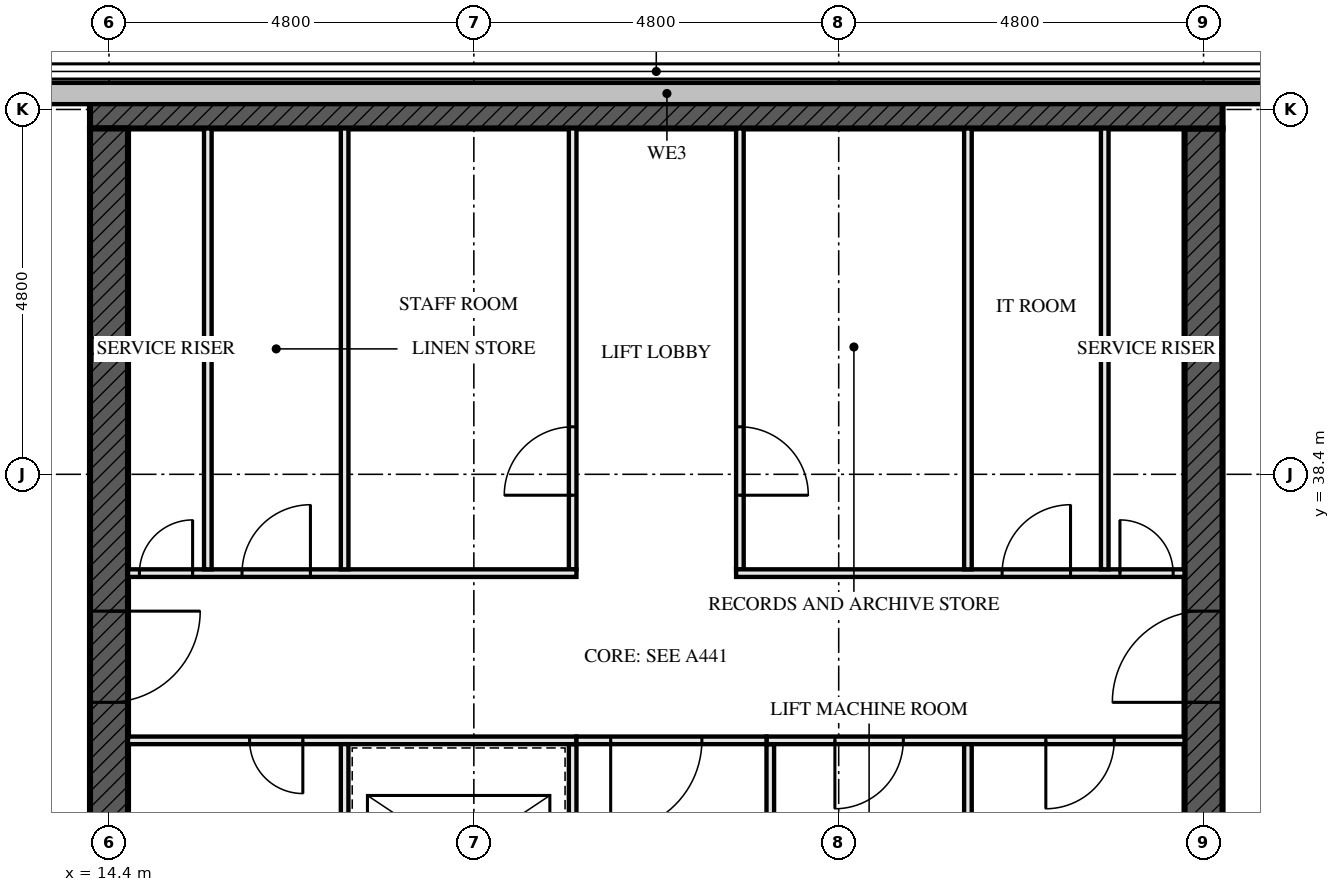
"""IFC4 building model, lengths in metres.
Left out: names, types, materials, properties, quantities, classifications, styles, units other than length and angle.
Written with IfcOpenShell. Run it as: python <this file> out.ifc"""

import sys

from ifc_helpers import new_model, si_unit, direction, frame, frame_2d, origin, place, context, subcontext, project, spatial, rectangle, extrude, element, fill, save


model = new_model("IFC4")
c1 = context("Model", 3, precision=1e-05, world=origin(), true_north=direction((0.0, 1.0)))
c2 = subcontext(c1, "Body", "Model", "MODEL_VIEW")
j1 = project(units=[si_unit("LENGTHUNIT", "METRE"), si_unit("PLANEANGLEUNIT", "RADIAN")], contexts=[c1])
p1 = place(None, origin())
s1 = spatial("IfcSite", under=j1, at=p1, CompositionType="ELEMENT")
p2 = place(p1, origin())
s2 = spatial("IfcBuilding", under=s1, at=p2, CompositionType="ELEMENT")
p3 = place(p2, frame((0.0, 0.0, 248.0)))
s3 = spatial("IfcBuildingStorey", under=s2, at=p3, CompositionType="ELEMENT", Elevation=248.0)
p4 = place(p3, frame((29.05, 43.2, -0.25), z_axis=(0.0, 0.0, 1.0), x_axis=(-1.0, 0.0, 0.0)))
e1 = element("IfcWall", 1, at=p4, inside=s3, PredefinedType="SHEAR", context=c2, shape_type="SweptSolid", body=[
    extrude(rectangle(XDim=14.9, YDim=0.5, at=frame_2d((7.45, 0.0))), origin(), (0.0, 0.0, 1.0), 4.5),
])
p5 = place(p3, frame((14.4, 42.95, -0.25), z_axis=(0.0, 0.0, 1.0), x_axis=(0.0, -1.0, 0.0)))
e2 = element("IfcWall", 2, at=p5, inside=s3, PredefinedType="SHEAR", context=c2, shape_type="SweptSolid", body=[
    extrude(rectangle(XDim=13.9, YDim=0.5, at=frame_2d((6.95, 0.0))), origin(), (0.0, 0.0, 1.0), 4.5),
])
p6 = place(p5, frame((6.35, 0.0, 0.25)))
e3 = element("IfcOpeningElement", 3, at=p6, cuts=e2, PredefinedType="OPENING", context=c2, shape_type="SweptSolid", body=[
    extrude(rectangle(XDim=1.2, YDim=2.1, at=frame_2d((0.6, 1.05))), frame((0.0, 0.26, 0.0), z_axis=(0.0, -1.0, 0.0), x_axis=(1.0, 0.0, 0.0)), (0.0, 0.0, 1.0), 0.521),
])
p7 = place(p3, frame((28.8, 29.05, -0.25), z_axis=(0.0, 0.0, 1.0), x_axis=(0.0, 1.0, 0.0)))
e4 = element("IfcWall", 4, at=p7, inside=s3, PredefinedType="SHEAR", context=c2, shape_type="SweptSolid", body=[
    extrude(rectangle(XDim=13.9, YDim=0.5, at=frame_2d((6.95, 0.0))), origin(), (0.0, 0.0, 1.0), 4.5),
])
p8 = place(p7, frame((6.35, 0.0, 0.25)))
e5 = element("IfcOpeningElement", 5, at=p8, cuts=e4, PredefinedType="OPENING", context=c2, shape_type="SweptSolid", body=[
    extrude(rectangle(XDim=1.2, YDim=2.1, at=frame_2d((0.6, 1.05))), frame((0.0, 0.26, 0.0), z_axis=(0.0, -1.0, 0.0), x_axis=(1.0, 0.0, 0.0)), (0.0, 0.0, 1.0), 0.521),
])
p9 = place(p3, frame((38.75, 43.41, 4.5), z_axis=(0.0, 0.0, 1.0), x_axis=(-1.0, 0.0, 0.0)))
e6 = element("IfcWall", 6, at=p9, inside=s3, PredefinedType="PARAPET", context=c2, shape_type="SweptSolid", body=[
    extrude(rectangle(XDim=34.02, YDim=0.28, at=frame_2d((17.01, 0.0))), origin(), (0.0, 0.0, 1.0), 1.1),
])
for number, where, z_axis, x_axis in (
    (7, (15.7, 37.15, 0.0), (0.0, 0.0, 1.0), (0.0, 1.0, 0.0)),
    (8, (27.5, 37.15, 0.0), (0.0, 0.0, 1.0), (0.0, 1.0, 0.0)),
):
    element("IfcWall", number, at=place(p3, frame(where, z_axis=z_axis, x_axis=x_axis)), inside=s3, PredefinedType="SOLIDWALL", context=c2, shape_type="SweptSolid", body=[
        extrude(rectangle(XDim=5.8, YDim=0.1, at=frame_2d((2.9, 0.0))), origin(), (0.0, 0.0, 1.0), 4.25),
    ])
p10 = place(p3, frame((20.5, 29.05, 0.0), z_axis=(0.0, 0.0, 1.0), x_axis=(0.0, 1.0, 0.0)))
e9 = element("IfcWall", 9, at=p10, inside=s3, PredefinedType="SOLIDWALL", context=c2, shape_type="SweptSolid", body=[
    extrude(rectangle(XDim=5.8, YDim=0.1, at=frame_2d((2.9, 0.0))), origin(), (0.0, 0.0, 1.0), 4.25),
])
p11 = place(p10, frame((0.8, 0.0, 0.0)))
e10 = element("IfcOpeningElement", 10, at=p11, cuts=e9, PredefinedType="OPENING", context=c2, shape_type="SweptSolid", body=[
    extrude(rectangle(XDim=1.1, YDim=2.3, at=frame_2d((0.55, 1.15))), frame((0.0, 0.061, 0.0), z_axis=(0.0, -1.0, 0.0), x_axis=(1.0, 0.0, 0.0)), (0.0, 0.0, 1.0), 0.121),
])
p12 = place(p10, frame((3.775, 0.0, 0.0)))
e11 = element("IfcOpeningElement", 11, at=p12, cuts=e9, PredefinedType="OPENING", context=c2, shape_type="SweptSolid", body=[
    extrude(rectangle(XDim=1.1, YDim=2.3, at=frame_2d((0.55, 1.15))), frame((0.0, 0.061, 0.0), z_axis=(0.0, -1.0, 0.0), x_axis=(1.0, 0.0, 0.0)), (0.0, 0.0, 1.0), 0.121),
])
p13 = place(p3, frame((20.5, 37.15, 0.0), z_axis=(0.0, 0.0, 1.0), x_axis=(0.0, 1.0, 0.0)))
e12 = element("IfcWall", 12, at=p13, inside=s3, PredefinedType="SOLIDWALL", context=c2, shape_type="SweptSolid", body=[
    extrude(rectangle(XDim=5.8, YDim=0.1, at=frame_2d((2.9, 0.0))), origin(), (0.0, 0.0, 1.0), 4.25),
])
p14 = place(p13, frame((0.975, 0.0, 0.0)))
e13 = element("IfcOpeningElement", 13, at=p14, cuts=e12, PredefinedType="OPENING", context=c2, shape_type="SweptSolid", body=[
    extrude(rectangle(XDim=0.9, YDim=2.1, at=frame_2d((0.45, 1.05))), frame((0.0, 0.061, 0.0), z_axis=(0.0, -1.0, 0.0), x_axis=(1.0, 0.0, 0.0)), (0.0, 0.0, 1.0), 0.121),
])
p15 = place(p3, frame((22.7, 37.15, 0.0), z_axis=(0.0, 0.0, 1.0), x_axis=(0.0, 1.0, 0.0)))
e14 = element("IfcWall", 14, at=p15, inside=s3, PredefinedType="SOLIDWALL", context=c2, shape_type="SweptSolid", body=[
    extrude(rectangle(XDim=5.8, YDim=0.1, at=frame_2d((2.9, 0.0))), origin(), (0.0, 0.0, 1.0), 4.25),
])
p16 = place(p15, frame((0.975, 0.0, 0.0)))
e15 = element("IfcOpeningElement", 15, at=p16, cuts=e14, PredefinedType="OPENING", context=c2, shape_type="SweptSolid", body=[
    extrude(rectangle(XDim=0.9, YDim=2.1, at=frame_2d((0.45, 1.05))), frame((0.0, 0.061, 0.0), z_axis=(0.0, -1.0, 0.0), x_axis=(1.0, 0.0, 0.0)), (0.0, 0.0, 1.0), 0.121),
])
p17 = place(p3, frame((23.1, 29.05, 0.0), z_axis=(0.0, 0.0, 1.0), x_axis=(0.0, 1.0, 0.0)))
e16 = element("IfcWall", 16, at=p17, inside=s3, PredefinedType="SOLIDWALL", context=c2, shape_type="SweptSolid", body=[
    extrude(rectangle(XDim=5.8, YDim=0.1, at=frame_2d((2.9, 0.0))), origin(), (0.0, 0.0, 1.0), 4.25),
])
p18 = place(p17, frame((1.0, 0.0, 0.0)))
e17 = element("IfcOpeningElement", 17, at=p18, cuts=e16, PredefinedType="OPENING", context=c2, shape_type="SweptSolid", body=[
    extrude(rectangle(XDim=0.7, YDim=2.1, at=frame_2d((0.35, 1.05))), frame((0.0, 0.061, 0.0), z_axis=(0.0, -1.0, 0.0), x_axis=(1.0, 0.0, 0.0)), (0.0, 0.0, 1.0), 0.121),
])
p19 = place(p3, frame((14.65, 34.9, 0.0), z_axis=(0.0, 0.0, 1.0), x_axis=(1.0, 0.0, 0.0)))
e18 = element("IfcWall", 18, at=p19, inside=s3, PredefinedType="SOLIDWALL", context=c2, shape_type="SweptSolid", body=[
    extrude(rectangle(XDim=5.9, YDim=0.1, at=frame_2d((2.95, 0.0))), origin(), (0.0, 0.0, 1.0), 4.25),
])
p20 = place(p19, frame((1.6, 0.0, 0.0)))
e19 = element("IfcOpeningElement", 19, at=p20, cuts=e18, PredefinedType="OPENING", context=c2, shape_type="SweptSolid", body=[
    extrude(rectangle(XDim=0.7, YDim=2.1, at=frame_2d((0.35, 1.05))), frame((0.0, 0.061, 0.0), z_axis=(0.0, -1.0, 0.0), x_axis=(1.0, 0.0, 0.0)), (0.0, 0.0, 1.0), 0.121),
])
p21 = place(p3, frame((23.05, 34.9, 0.0), z_axis=(0.0, 0.0, 1.0), x_axis=(1.0, 0.0, 0.0)))
e20 = element("IfcWall", 20, at=p21, inside=s3, PredefinedType="SOLIDWALL", context=c2, shape_type="SweptSolid", body=[
    extrude(rectangle(XDim=5.5, YDim=0.1, at=frame_2d((2.75, 0.0))), origin(), (0.0, 0.0, 1.0), 4.25),
])
p22 = place(p21, frame((0.9, 0.0, 0.0)))
e21 = element("IfcOpeningElement", 21, at=p22, cuts=e20, PredefinedType="OPENING", context=c2, shape_type="SweptSolid", body=[
    extrude(rectangle(XDim=0.9, YDim=2.1, at=frame_2d((0.45, 1.05))), frame((0.0, 0.061, 0.0), z_axis=(0.0, -1.0, 0.0), x_axis=(1.0, 0.0, 0.0)), (0.0, 0.0, 1.0), 0.121),
])
p23 = place(p21, frame((3.675, 0.0, 0.0)))
e22 = element("IfcOpeningElement", 22, at=p23, cuts=e20, PredefinedType="OPENING", context=c2, shape_type="SweptSolid", body=[
    extrude(rectangle(XDim=0.9, YDim=2.1, at=frame_2d((0.45, 1.05))), frame((0.0, 0.061, 0.0), z_axis=(0.0, -1.0, 0.0), x_axis=(1.0, 0.0, 0.0)), (0.0, 0.0, 1.0), 0.121),
])
p24 = place(p3, frame((14.65, 37.1, 0.0), z_axis=(0.0, 0.0, 1.0), x_axis=(1.0, 0.0, 0.0)))
e23 = element("IfcWall", 23, at=p24, inside=s3, PredefinedType="SOLIDWALL", context=c2, shape_type="SweptSolid", body=[
    extrude(rectangle(XDim=5.9, YDim=0.1, at=frame_2d((2.95, 0.0))), origin(), (0.0, 0.0, 1.0), 4.25),
])
p25 = place(p24, frame((0.15, 0.0, 0.0)))
e24 = element("IfcOpeningElement", 24, at=p25, cuts=e23, PredefinedType="OPENING", context=c2, shape_type="SweptSolid", body=[
    extrude(rectangle(XDim=0.7, YDim=2.1, at=frame_2d((0.35, 1.05))), frame((0.0, 0.061, 0.0), z_axis=(0.0, -1.0, 0.0), x_axis=(1.0, 0.0, 0.0)), (0.0, 0.0, 1.0), 0.121),
])
p26 = place(p24, frame((1.5, 0.0, 0.0)))
e25 = element("IfcOpeningElement", 25, at=p26, cuts=e23, PredefinedType="OPENING", context=c2, shape_type="SweptSolid", body=[
    extrude(rectangle(XDim=0.9, YDim=2.1, at=frame_2d((0.45, 1.05))), frame((0.0, 0.061, 0.0), z_axis=(0.0, -1.0, 0.0), x_axis=(1.0, 0.0, 0.0)), (0.0, 0.0, 1.0), 0.121),
])
p27 = place(p3, frame((22.65, 37.1, 0.0), z_axis=(0.0, 0.0, 1.0), x_axis=(1.0, 0.0, 0.0)))
e26 = element("IfcWall", 26, at=p27, inside=s3, PredefinedType="SOLIDWALL", context=c2, shape_type="SweptSolid", body=[
    extrude(rectangle(XDim=5.9, YDim=0.1, at=frame_2d((2.95, 0.0))), origin(), (0.0, 0.0, 1.0), 4.25),
])
p28 = place(p27, frame((3.5, 0.0, 0.0)))
e27 = element("IfcOpeningElement", 27, at=p28, cuts=e26, PredefinedType="OPENING", context=c2, shape_type="SweptSolid", body=[
    extrude(rectangle(XDim=0.9, YDim=2.1, at=frame_2d((0.45, 1.05))), frame((0.0, 0.061, 0.0), z_axis=(0.0, -1.0, 0.0), x_axis=(1.0, 0.0, 0.0)), (0.0, 0.0, 1.0), 0.121),
])
p29 = place(p27, frame((5.05, 0.0, 0.0)))
e28 = element("IfcOpeningElement", 28, at=p29, cuts=e26, PredefinedType="OPENING", context=c2, shape_type="SweptSolid", body=[
    extrude(rectangle(XDim=0.7, YDim=2.1, at=frame_2d((0.35, 1.05))), frame((0.0, 0.061, 0.0), z_axis=(0.0, -1.0, 0.0), x_axis=(1.0, 0.0, 0.0)), (0.0, 0.0, 1.0), 0.121),
])
p30 = place(p3, frame((20.55, 34.9, 0.0), z_axis=(0.0, 0.0, 1.0), x_axis=(1.0, 0.0, 0.0)))
e29 = element("IfcWall", 29, at=p30, inside=s3, PredefinedType="SOLIDWALL", context=c2, shape_type="SweptSolid", body=[
    extrude(rectangle(XDim=2.5, YDim=0.1, at=frame_2d((1.25, 0.0))), origin(), (0.0, 0.0, 1.0), 3.04),
])
p31 = place(p30, frame((0.45, 0.0, 0.0)))
e30 = element("IfcOpeningElement", 30, at=p31, cuts=e29, PredefinedType="OPENING", context=c2, shape_type="SweptSolid", body=[
    extrude(rectangle(XDim=1.2, YDim=2.1, at=frame_2d((0.6, 1.05))), frame((0.0, 0.061, 0.0), z_axis=(0.0, -1.0, 0.0), x_axis=(1.0, 0.0, 0.0)), (0.0, 0.0, 1.0), 0.121),
])
for number, where, z_axis, x_axis in (
    (31, (17.5, 29.05, 0.0), (0.0, 0.0, 1.0), (0.0, 1.0, 0.0)),
    (32, (17.5, 37.15, 0.0), (0.0, 0.0, 1.0), (0.0, 1.0, 0.0)),
    (33, (25.7, 37.15, 0.0), (0.0, 0.0, 1.0), (0.0, 1.0, 0.0)),
):
    element("IfcWall", number, at=place(p3, frame(where, z_axis=z_axis, x_axis=x_axis)), inside=s3, PredefinedType="SOLIDWALL", context=c2, shape_type="SweptSolid", body=[
        extrude(rectangle(XDim=5.8, YDim=0.1, at=frame_2d((2.9, 0.0))), origin(), (0.0, 0.0, 1.0), 4.25),
    ])
p32 = place(p3, frame((25.7, 31.95, 0.0), z_axis=(0.0, 0.0, 1.0), x_axis=(0.0, 1.0, 0.0)))
e34 = element("IfcWall", 34, at=p32, inside=s3, PredefinedType="SOLIDWALL", context=c2, shape_type="SweptSolid", body=[
    extrude(rectangle(XDim=2.9, YDim=0.1, at=frame_2d((1.45, 0.0))), origin(), (0.0, 0.0, 1.0), 4.25),
])
p33 = place(p14, origin())
e35 = element("IfcDoor", 35, at=p33, inside=s3, OperationType="SINGLE_SWING_RIGHT", PredefinedType="DOOR", context=c2, shape_type="SweptSolid", body=[
    extrude(rectangle(XDim=0.9, YDim=2.1, at=frame_2d((0.45, 1.05))), frame((0.0, 0.027, 0.0), z_axis=(0.0, -1.0, 0.0), x_axis=(1.0, 0.0, 0.0)), (0.0, 0.0, 1.0), 0.054),
])
fill(e13, e35)
p34 = place(p16, frame((0.9, 0.0, 0.0), z_axis=(0.0, 0.0, 1.0), x_axis=(-1.0, 0.0, 0.0)))
e36 = element("IfcDoor", 36, at=p34, inside=s3, OperationType="SINGLE_SWING_LEFT", PredefinedType="DOOR", context=c2, shape_type="SweptSolid", body=[
    extrude(rectangle(XDim=0.9, YDim=2.1, at=frame_2d((0.45, 1.05))), frame((0.0, 0.027, 0.0), z_axis=(0.0, -1.0, 0.0), x_axis=(1.0, 0.0, 0.0)), (0.0, 0.0, 1.0), 0.054),
])
fill(e15, e36)
p35 = place(p20, frame((0.7, 0.0, 0.0), z_axis=(0.0, 0.0, 1.0), x_axis=(-1.0, 0.0, 0.0)))
e37 = element("IfcDoor", 37, at=p35, inside=s3, OperationType="SINGLE_SWING_RIGHT", PredefinedType="DOOR", context=c2, shape_type="SweptSolid", body=[
    extrude(rectangle(XDim=0.7, YDim=2.1, at=frame_2d((0.35, 1.05))), frame((0.0, 0.027, 0.0), z_axis=(0.0, -1.0, 0.0), x_axis=(1.0, 0.0, 0.0)), (0.0, 0.0, 1.0), 0.054),
])
fill(e19, e37)
p36 = place(p22, frame((0.9, 0.0, 0.0), z_axis=(0.0, 0.0, 1.0), x_axis=(-1.0, 0.0, 0.0)))
e38 = element("IfcDoor", 38, at=p36, inside=s3, OperationType="SINGLE_SWING_LEFT", PredefinedType="DOOR", context=c2, shape_type="SweptSolid", body=[
    extrude(rectangle(XDim=0.9, YDim=2.1, at=frame_2d((0.45, 1.05))), frame((0.0, 0.027, 0.0), z_axis=(0.0, -1.0, 0.0), x_axis=(1.0, 0.0, 0.0)), (0.0, 0.0, 1.0), 0.054),
])
fill(e21, e38)
p37 = place(p23, frame((0.9, 0.0, 0.0), z_axis=(0.0, 0.0, 1.0), x_axis=(-1.0, 0.0, 0.0)))
e39 = element("IfcDoor", 39, at=p37, inside=s3, OperationType="SINGLE_SWING_LEFT", PredefinedType="DOOR", context=c2, shape_type="SweptSolid", body=[
    extrude(rectangle(XDim=0.9, YDim=2.1, at=frame_2d((0.45, 1.05))), frame((0.0, 0.027, 0.0), z_axis=(0.0, -1.0, 0.0), x_axis=(1.0, 0.0, 0.0)), (0.0, 0.0, 1.0), 0.054),
])
fill(e22, e39)
p38 = place(p25, origin())
e40 = element("IfcDoor", 40, at=p38, inside=s3, OperationType="SINGLE_SWING_LEFT", PredefinedType="DOOR", context=c2, shape_type="SweptSolid", body=[
    extrude(rectangle(XDim=0.7, YDim=2.1, at=frame_2d((0.35, 1.05))), frame((0.0, 0.027, 0.0), z_axis=(0.0, -1.0, 0.0), x_axis=(1.0, 0.0, 0.0)), (0.0, 0.0, 1.0), 0.054),
])
fill(e24, e40)
p39 = place(p26, origin())
e41 = element("IfcDoor", 41, at=p39, inside=s3, OperationType="SINGLE_SWING_LEFT", PredefinedType="DOOR", context=c2, shape_type="SweptSolid", body=[
    extrude(rectangle(XDim=0.9, YDim=2.1, at=frame_2d((0.45, 1.05))), frame((0.0, 0.027, 0.0), z_axis=(0.0, -1.0, 0.0), x_axis=(1.0, 0.0, 0.0)), (0.0, 0.0, 1.0), 0.054),
])
fill(e25, e41)
p40 = place(p28, origin())
e42 = element("IfcDoor", 42, at=p40, inside=s3, OperationType="SINGLE_SWING_LEFT", PredefinedType="DOOR", context=c2, shape_type="SweptSolid", body=[
    extrude(rectangle(XDim=0.9, YDim=2.1, at=frame_2d((0.45, 1.05))), frame((0.0, 0.027, 0.0), z_axis=(0.0, -1.0, 0.0), x_axis=(1.0, 0.0, 0.0)), (0.0, 0.0, 1.0), 0.054),
])
fill(e27, e42)
p41 = place(p29, origin())
e43 = element("IfcDoor", 43, at=p41, inside=s3, OperationType="SINGLE_SWING_RIGHT", PredefinedType="DOOR", context=c2, shape_type="SweptSolid", body=[
    extrude(rectangle(XDim=0.7, YDim=2.1, at=frame_2d((0.35, 1.05))), frame((0.0, 0.027, 0.0), z_axis=(0.0, -1.0, 0.0), x_axis=(1.0, 0.0, 0.0)), (0.0, 0.0, 1.0), 0.054),
])
fill(e28, e43)
p42 = place(p31, frame((1.2, 0.0, 0.0), z_axis=(0.0, 0.0, 1.0), x_axis=(-1.0, 0.0, 0.0)))
e44 = element("IfcDoor", 44, at=p42, inside=s3, OperationType="SINGLE_SWING_LEFT", PredefinedType="DOOR", context=c2, shape_type="SweptSolid", body=[
    extrude(rectangle(XDim=1.2, YDim=2.1, at=frame_2d((0.6, 1.05))), frame((0.0, 0.027, 0.0), z_axis=(0.0, -1.0, 0.0), x_axis=(1.0, 0.0, 0.0)), (0.0, 0.0, 1.0), 0.054),
])
fill(e30, e44)
p43 = place(p6, origin())
e45 = element("IfcDoor", 45, at=p43, inside=s3, OperationType="SINGLE_SWING_LEFT", PredefinedType="DOOR", context=c2, shape_type="SweptSolid", body=[
    extrude(rectangle(XDim=1.2, YDim=2.1, at=frame_2d((0.6, 1.05))), frame((0.0, 0.027, 0.0), z_axis=(0.0, -1.0, 0.0), x_axis=(1.0, 0.0, 0.0)), (0.0, 0.0, 1.0), 0.054),
])
fill(e3, e45)
p44 = place(p8, origin())
e46 = element("IfcDoor", 46, at=p44, inside=s3, OperationType="SINGLE_SWING_LEFT", PredefinedType="DOOR", context=c2, shape_type="SweptSolid", body=[
    extrude(rectangle(XDim=1.2, YDim=2.1, at=frame_2d((0.6, 1.05))), frame((0.0, 0.027, 0.0), z_axis=(0.0, -1.0, 0.0), x_axis=(1.0, 0.0, 0.0)), (0.0, 0.0, 1.0), 0.054),
])
fill(e5, e46)
save(model, sys.argv[1])
